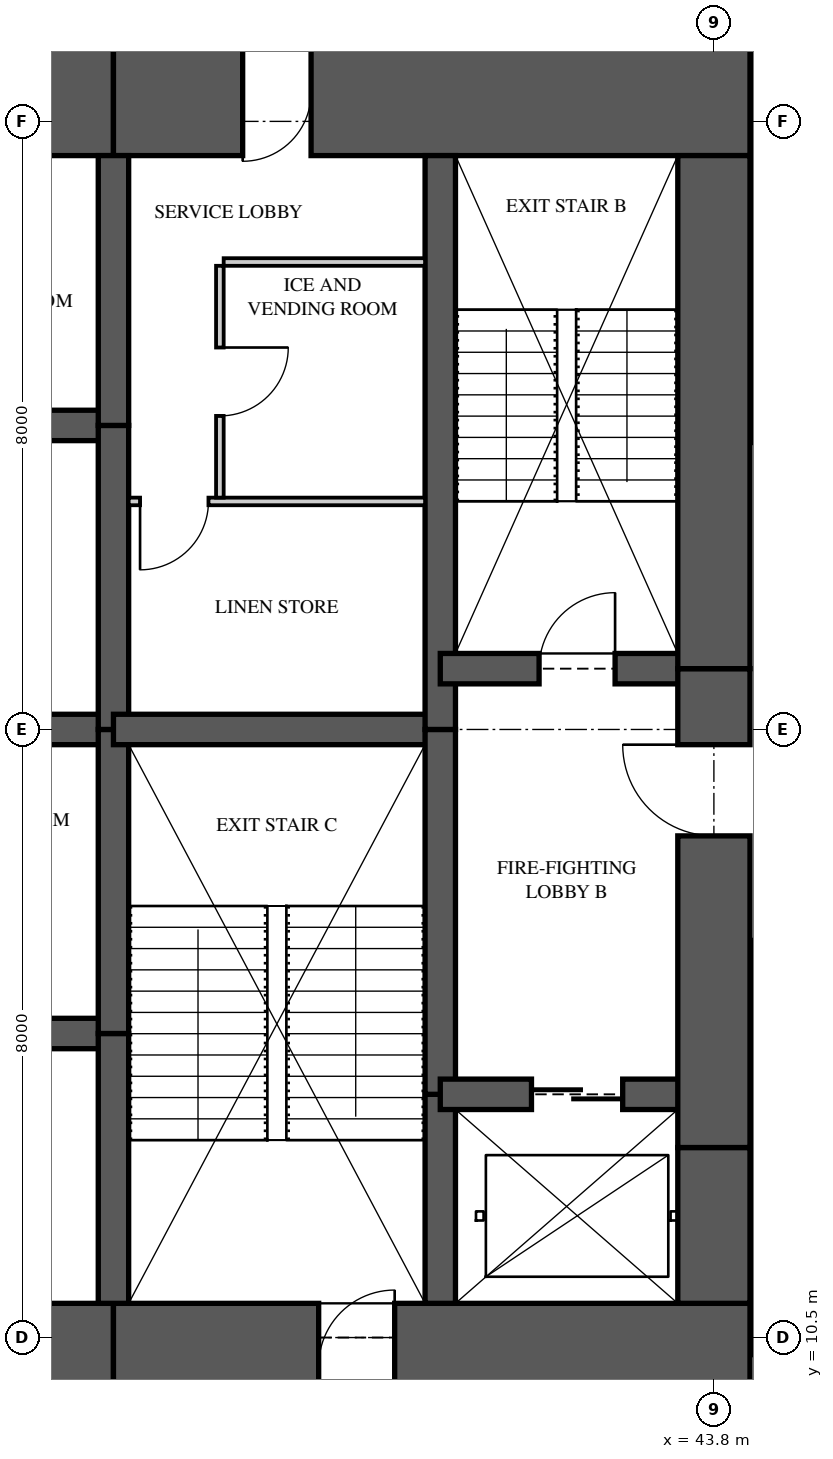
"""IFC4 building model, lengths in metres.
Left out: names, types, materials, properties, quantities, classifications, styles, units other than length and angle.
Written with IfcOpenShell. Run it as: python <this file> out.ifc"""

import sys

from ifc_helpers import new_model, si_unit, direction, frame, frame_2d, origin, place, context, subcontext, project, spatial, rectangle, extrude, element, fill, save


model = new_model("IFC4")
c1 = context("Model", 3, precision=1e-05, world=origin(), true_north=direction((0.0, 1.0)))
c2 = subcontext(c1, "Body", "Model", "MODEL_VIEW")
j1 = project(units=[si_unit("LENGTHUNIT", "METRE"), si_unit("PLANEANGLEUNIT", "RADIAN")], contexts=[c1])
p1 = place(None, origin())
s1 = spatial("IfcSite", under=j1, at=p1, CompositionType="ELEMENT")
p2 = place(p1, origin())
s2 = spatial("IfcBuilding", under=s1, at=p2, CompositionType="ELEMENT")
p3 = place(p2, frame((0.0, 0.0, 31.05)))
s3 = spatial("IfcBuildingStorey", under=s2, at=p3, CompositionType="ELEMENT", Elevation=31.05)
p4 = place(p3, frame((31.6, 10.125, 0.0), z_axis=(0.0, 0.0, 1.0), x_axis=(1.0, 0.0, 0.0)))
e1 = element("IfcWall", 1, at=p4, inside=s3, PredefinedType="SHEAR", context=c2, shape_type="SweptSolid", body=[
    extrude(rectangle(XDim=4.3, YDim=1.65, at=frame_2d((2.15, 0.0))), origin(), (0.0, 0.0, 1.0), 3.35),
])
p5 = place(p3, frame((35.9, 10.125, 0.0), z_axis=(0.0, 0.0, 1.0), x_axis=(1.0, 0.0, 0.0)))
e2 = element("IfcWall", 2, at=p5, inside=s3, PredefinedType="SHEAR", context=c2, shape_type="SweptSolid", body=[
    extrude(rectangle(XDim=8.375, YDim=1.65, at=frame_2d((4.188, 0.0))), origin(), (0.0, 0.0, 1.0), 3.35),
])
p6 = place(p5, frame((2.7, 0.0, 0.0)))
e3 = element("IfcOpeningElement", 3, at=p6, cuts=e2, PredefinedType="OPENING", context=c2, shape_type="SweptSolid", body=[
    extrude(rectangle(XDim=1.0, YDim=2.1, at=frame_2d((0.5, 1.05))), frame((0.0, 0.835, 0.0), z_axis=(0.0, -1.0, 0.0), x_axis=(1.0, 0.0, 0.0)), (0.0, 0.0, 1.0), 1.67),
])
p7 = place(p3, frame((44.275, 26.875, 0.0), z_axis=(0.0, 0.0, 1.0), x_axis=(-1.0, 0.0, 0.0)))
e4 = element("IfcWall", 4, at=p7, inside=s3, PredefinedType="SHEAR", context=c2, shape_type="SweptSolid", body=[
    extrude(rectangle(XDim=8.375, YDim=1.65, at=frame_2d((4.188, 0.0))), origin(), (0.0, 0.0, 1.0), 3.35),
])
p8 = place(p7, frame((5.775, 0.0, 0.0)))
e5 = element("IfcOpeningElement", 5, at=p8, cuts=e4, PredefinedType="OPENING", context=c2, shape_type="SweptSolid", body=[
    extrude(rectangle(XDim=0.9, YDim=2.1, at=frame_2d((0.45, 1.05))), frame((0.0, 0.835, 0.0), z_axis=(0.0, -1.0, 0.0), x_axis=(1.0, 0.0, 0.0)), (0.0, 0.0, 1.0), 1.67),
])
p9 = place(p3, frame((35.9, 26.875, 0.0), z_axis=(0.0, 0.0, 1.0), x_axis=(-1.0, 0.0, 0.0)))
e6 = element("IfcWall", 6, at=p9, inside=s3, PredefinedType="SHEAR", context=c2, shape_type="SweptSolid", body=[
    extrude(rectangle(XDim=4.3, YDim=1.65, at=frame_2d((2.15, 0.0))), origin(), (0.0, 0.0, 1.0), 3.35),
])
p10 = place(p3, frame((43.8, 10.95, 0.0), z_axis=(0.0, 0.0, 1.0), x_axis=(0.0, 1.0, 0.0)))
e7 = element("IfcWall", 7, at=p10, inside=s3, PredefinedType="SHEAR", context=c2, shape_type="SweptSolid", body=[
    extrude(rectangle(XDim=2.05, YDim=0.95, at=frame_2d((1.025, 0.0))), origin(), (0.0, 0.0, 1.0), 3.35),
])
p11 = place(p3, frame((43.8, 13.0, 0.0), z_axis=(0.0, 0.0, 1.0), x_axis=(0.0, 1.0, 0.0)))
e8 = element("IfcWall", 8, at=p11, inside=s3, PredefinedType="SHEAR", context=c2, shape_type="SweptSolid", body=[
    extrude(rectangle(XDim=6.3, YDim=0.95, at=frame_2d((3.15, 0.0))), origin(), (0.0, 0.0, 1.0), 3.35),
])
p12 = place(p11, frame((4.1, 0.0, 0.0)))
e9 = element("IfcOpeningElement", 9, at=p12, cuts=e8, PredefinedType="OPENING", context=c2, shape_type="SweptSolid", body=[
    extrude(rectangle(XDim=1.2, YDim=2.2, at=frame_2d((0.6, 1.1))), frame((0.0, 0.485, 0.0), z_axis=(0.0, -1.0, 0.0), x_axis=(1.0, 0.0, 0.0)), (0.0, 0.0, 1.0), 0.97),
])
p13 = place(p3, frame((43.8, 19.3, 0.0), z_axis=(0.0, 0.0, 1.0), x_axis=(0.0, 1.0, 0.0)))
e10 = element("IfcWall", 10, at=p13, inside=s3, PredefinedType="SHEAR", context=c2, shape_type="SweptSolid", body=[
    extrude(rectangle(XDim=6.75, YDim=0.95, at=frame_2d((3.375, 0.0))), origin(), (0.0, 0.0, 1.0), 3.35),
])
p14 = place(p3, frame((35.9, 10.95, 0.0), z_axis=(0.0, 0.0, 1.0), x_axis=(0.0, 1.0, 0.0)))
e11 = element("IfcWall", 11, at=p14, inside=s3, PredefinedType="SHEAR", context=c2, shape_type="SweptSolid", body=[
    extrude(rectangle(XDim=3.55, YDim=0.4, at=frame_2d((1.775, 0.0))), origin(), (0.0, 0.0, 1.0), 3.35),
])
for number, where, z_axis, x_axis in (
    (12, (35.9, 14.5, 0.0), (0.0, 0.0, 1.0), (0.0, 1.0, 0.0)),
    (13, (35.9, 18.5, 0.0), (0.0, 0.0, 1.0), (0.0, 1.0, 0.0)),
):
    element("IfcWall", number, at=place(p3, frame(where, z_axis=z_axis, x_axis=x_axis)), inside=s3, PredefinedType="SHEAR", context=c2, shape_type="SweptSolid", body=[
        extrude(rectangle(XDim=4.0, YDim=0.4, at=frame_2d((2.0, 0.0))), origin(), (0.0, 0.0, 1.0), 3.35),
    ])
p15 = place(p3, frame((35.9, 22.5, 0.0), z_axis=(0.0, 0.0, 1.0), x_axis=(0.0, 1.0, 0.0)))
e14 = element("IfcWall", 14, at=p15, inside=s3, PredefinedType="SHEAR", context=c2, shape_type="SweptSolid", body=[
    extrude(rectangle(XDim=3.55, YDim=0.4, at=frame_2d((1.775, 0.0))), origin(), (0.0, 0.0, 1.0), 3.35),
])
p16 = place(p3, frame((40.2, 10.95, 0.0), z_axis=(0.0, 0.0, 1.0), x_axis=(0.0, 1.0, 0.0)))
e15 = element("IfcWall", 15, at=p16, inside=s3, PredefinedType="SHEAR", context=c2, shape_type="SweptSolid", body=[
    extrude(rectangle(XDim=2.75, YDim=0.4, at=frame_2d((1.375, 0.0))), origin(), (0.0, 0.0, 1.0), 3.35),
])
p17 = place(p3, frame((40.2, 13.7, 0.0), z_axis=(0.0, 0.0, 1.0), x_axis=(0.0, 1.0, 0.0)))
e16 = element("IfcWall", 16, at=p17, inside=s3, PredefinedType="SHEAR", context=c2, shape_type="SweptSolid", body=[
    extrude(rectangle(XDim=4.8, YDim=0.4, at=frame_2d((2.4, 0.0))), origin(), (0.0, 0.0, 1.0), 3.35),
])
p18 = place(p3, frame((40.2, 18.5, 0.0), z_axis=(0.0, 0.0, 1.0), x_axis=(0.0, 1.0, 0.0)))
e17 = element("IfcWall", 17, at=p18, inside=s3, PredefinedType="SHEAR", context=c2, shape_type="SweptSolid", body=[
    extrude(rectangle(XDim=7.55, YDim=0.4, at=frame_2d((3.775, 0.0))), origin(), (0.0, 0.0, 1.0), 3.35),
])
for number, where, z_axis, x_axis in (
    (18, (31.6, 14.5, 0.0), (0.0, 0.0, 1.0), (1.0, 0.0, 0.0)),
    (19, (31.6, 18.5, 0.0), (0.0, 0.0, 1.0), (1.0, 0.0, 0.0)),
    (20, (31.6, 22.5, 0.0), (0.0, 0.0, 1.0), (1.0, 0.0, 0.0)),
):
    element("IfcWall", number, at=place(p3, frame(where, z_axis=z_axis, x_axis=x_axis)), inside=s3, PredefinedType="SHEAR", context=c2, shape_type="SweptSolid", body=[
        extrude(rectangle(XDim=4.3, YDim=0.4, at=frame_2d((2.15, 0.0))), origin(), (0.0, 0.0, 1.0), 3.35),
    ])
p19 = place(p3, frame((35.9, 18.5, 0.0), z_axis=(0.0, 0.0, 1.0), x_axis=(1.0, 0.0, 0.0)))
e21 = element("IfcWall", 21, at=p19, inside=s3, PredefinedType="SHEAR", context=c2, shape_type="SweptSolid", body=[
    extrude(rectangle(XDim=4.3, YDim=0.4, at=frame_2d((2.15, 0.0))), origin(), (0.0, 0.0, 1.0), 3.35),
])
p20 = place(p3, frame((40.2, 13.7, 0.0), z_axis=(0.0, 0.0, 1.0), x_axis=(1.0, 0.0, 0.0)))
e22 = element("IfcWall", 22, at=p20, inside=s3, PredefinedType="SHEAR", context=c2, shape_type="SweptSolid", body=[
    extrude(rectangle(XDim=3.6, YDim=0.4, at=frame_2d((1.8, 0.0))), origin(), (0.0, 0.0, 1.0), 3.35),
])
p21 = place(p20, frame((1.2, 0.0, 0.0)))
e23 = element("IfcOpeningElement", 23, at=p21, cuts=e22, PredefinedType="OPENING", context=c2, shape_type="SweptSolid", body=[
    extrude(rectangle(XDim=1.2, YDim=2.1, at=frame_2d((0.6, 1.05))), frame((0.0, 0.21, 0.0), z_axis=(0.0, -1.0, 0.0), x_axis=(1.0, 0.0, 0.0)), (0.0, 0.0, 1.0), 0.42),
])
p22 = place(p3, frame((40.2, 19.3, 0.0), z_axis=(0.0, 0.0, 1.0), x_axis=(1.0, 0.0, 0.0)))
e24 = element("IfcWall", 24, at=p22, inside=s3, PredefinedType="SHEAR", context=c2, shape_type="SweptSolid", body=[
    extrude(rectangle(XDim=3.6, YDim=0.4, at=frame_2d((1.8, 0.0))), origin(), (0.0, 0.0, 1.0), 3.35),
])
p23 = place(p22, frame((1.3, 0.0, 0.0)))
e25 = element("IfcOpeningElement", 25, at=p23, cuts=e24, PredefinedType="OPENING", context=c2, shape_type="SweptSolid", body=[
    extrude(rectangle(XDim=1.0, YDim=2.1, at=frame_2d((0.5, 1.05))), frame((0.0, 0.21, 0.0), z_axis=(0.0, -1.0, 0.0), x_axis=(1.0, 0.0, 0.0)), (0.0, 0.0, 1.0), 0.42),
])
p24 = place(p3, frame((37.35, 24.65, 0.0), z_axis=(0.0, 0.0, 1.0), x_axis=(1.0, 0.0, 0.0)))
e26 = element("IfcWall", 26, at=p24, inside=s3, PredefinedType="PARTITIONING", context=c2, shape_type="SweptSolid", body=[
    extrude(rectangle(XDim=2.65, YDim=0.1, at=frame_2d((1.325, 0.0))), origin(), (0.0, 0.0, 1.0), 3.11),
])
p25 = place(p3, frame((37.3, 21.55, 0.0), z_axis=(0.0, 0.0, 1.0), x_axis=(0.0, 1.0, 0.0)))
e27 = element("IfcWall", 27, at=p25, inside=s3, PredefinedType="PARTITIONING", context=c2, shape_type="SweptSolid", body=[
    extrude(rectangle(XDim=3.05, YDim=0.1, at=frame_2d((1.525, 0.0))), origin(), (0.0, 0.0, 1.0), 3.11),
])
p26 = place(p25, frame((1.075, 0.0, 0.0)))
e28 = element("IfcOpeningElement", 28, at=p26, cuts=e27, PredefinedType="OPENING", context=c2, shape_type="SweptSolid", body=[
    extrude(rectangle(XDim=0.9, YDim=2.1, at=frame_2d((0.45, 1.05))), frame((0.0, 0.06, 0.0), z_axis=(0.0, -1.0, 0.0), x_axis=(1.0, 0.0, 0.0)), (0.0, 0.0, 1.0), 0.12),
])
p27 = place(p3, frame((36.1, 21.5, 0.0), z_axis=(0.0, 0.0, 1.0), x_axis=(1.0, 0.0, 0.0)))
e29 = element("IfcWall", 29, at=p27, inside=s3, PredefinedType="PARTITIONING", context=c2, shape_type="SweptSolid", body=[
    extrude(rectangle(XDim=3.9, YDim=0.1, at=frame_2d((1.95, 0.0))), origin(), (0.0, 0.0, 1.0), 3.11),
])
p28 = place(p27, frame((0.15, 0.0, 0.0)))
e30 = element("IfcOpeningElement", 30, at=p28, cuts=e29, PredefinedType="OPENING", context=c2, shape_type="SweptSolid", body=[
    extrude(rectangle(XDim=0.9, YDim=2.1, at=frame_2d((0.45, 1.05))), frame((0.0, 0.06, 0.0), z_axis=(0.0, -1.0, 0.0), x_axis=(1.0, 0.0, 0.0)), (0.0, 0.0, 1.0), 0.12),
])
p29 = place(p26, frame((0.9, 0.0, 0.0), z_axis=(0.0, 0.0, 1.0), x_axis=(-1.0, 0.0, 0.0)))
e31 = element("IfcDoor", 31, at=p29, inside=s3, OperationType="SINGLE_SWING_LEFT", PredefinedType="DOOR", context=c2, shape_type="SweptSolid", body=[
    extrude(rectangle(XDim=0.9, YDim=2.1, at=frame_2d((0.45, 1.05))), frame((0.0, 0.025, 0.0), z_axis=(0.0, -1.0, 0.0), x_axis=(1.0, 0.0, 0.0)), (0.0, 0.0, 1.0), 0.05),
])
fill(e28, e31)
p30 = place(p28, frame((0.9, 0.0, 0.0), z_axis=(0.0, 0.0, 1.0), x_axis=(-1.0, 0.0, 0.0)))
e32 = element("IfcDoor", 32, at=p30, inside=s3, OperationType="SINGLE_SWING_RIGHT", PredefinedType="DOOR", context=c2, shape_type="SweptSolid", body=[
    extrude(rectangle(XDim=0.9, YDim=2.1, at=frame_2d((0.45, 1.05))), frame((0.0, 0.025, 0.0), z_axis=(0.0, -1.0, 0.0), x_axis=(1.0, 0.0, 0.0)), (0.0, 0.0, 1.0), 0.05),
])
fill(e30, e32)
p31 = place(p23, origin())
e33 = element("IfcDoor", 33, at=p31, inside=s3, OperationType="SINGLE_SWING_RIGHT", PredefinedType="DOOR", context=c2, shape_type="SweptSolid", body=[
    extrude(rectangle(XDim=1.0, YDim=2.1, at=frame_2d((0.5, 1.05))), frame((0.0, 0.025, 0.0), z_axis=(0.0, -1.0, 0.0), x_axis=(1.0, 0.0, 0.0)), (0.0, 0.0, 1.0), 0.05),
])
fill(e25, e33)
p32 = place(p12, origin())
e34 = element("IfcDoor", 34, at=p32, inside=s3, OperationType="SINGLE_SWING_RIGHT", PredefinedType="DOOR", context=c2, shape_type="SweptSolid", body=[
    extrude(rectangle(XDim=1.2, YDim=2.2, at=frame_2d((0.6, 1.1))), frame((0.0, 0.025, 0.0), z_axis=(0.0, -1.0, 0.0), x_axis=(1.0, 0.0, 0.0)), (0.0, 0.0, 1.0), 0.05),
])
fill(e9, e34)
p33 = place(p21, origin())
e35 = element("IfcDoor", 35, at=p33, inside=s3, OperationType="SLIDING_TO_LEFT", PredefinedType="DOOR", context=c2, shape_type="SweptSolid", body=[
    extrude(rectangle(XDim=1.2, YDim=2.1, at=frame_2d((0.6, 1.05))), frame((0.0, 0.025, 0.0), z_axis=(0.0, -1.0, 0.0), x_axis=(1.0, 0.0, 0.0)), (0.0, 0.0, 1.0), 0.05),
])
fill(e23, e35)
p34 = place(p6, origin())
e36 = element("IfcDoor", 36, at=p34, inside=s3, OperationType="SINGLE_SWING_RIGHT", PredefinedType="DOOR", context=c2, shape_type="SweptSolid", body=[
    extrude(rectangle(XDim=1.0, YDim=2.1, at=frame_2d((0.5, 1.05))), frame((0.0, 0.025, 0.0), z_axis=(0.0, -1.0, 0.0), x_axis=(1.0, 0.0, 0.0)), (0.0, 0.0, 1.0), 0.05),
])
fill(e3, e36)
p35 = place(p8, origin())
e37 = element("IfcDoor", 37, at=p35, inside=s3, OperationType="SINGLE_SWING_RIGHT", PredefinedType="DOOR", context=c2, shape_type="SweptSolid", body=[
    extrude(rectangle(XDim=0.9, YDim=2.1, at=frame_2d((0.45, 1.05))), frame((0.0, 0.47, 0.0), z_axis=(0.0, -1.0, 0.0), x_axis=(1.0, 0.0, 0.0)), (0.0, 0.0, 1.0), 0.8),
])
fill(e5, e37)
save(model, sys.argv[1])
